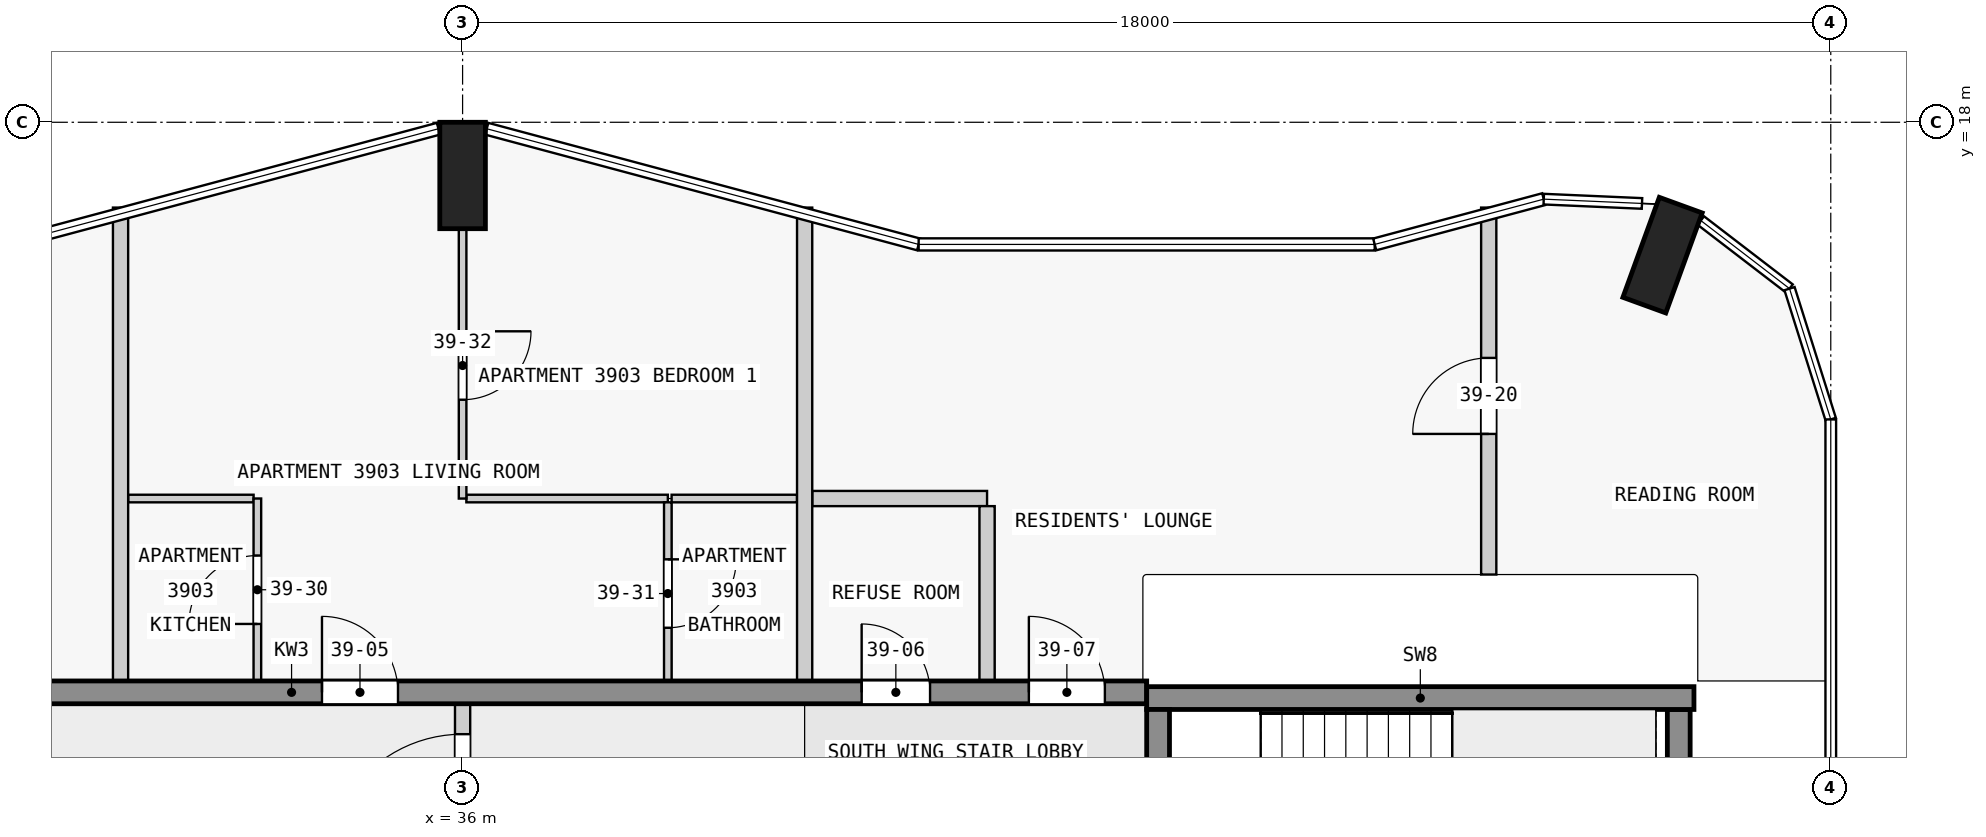
"""IFC4 building model, lengths in metres.
Left out: names, types, materials, properties, quantities, classifications, styles, units other than length and angle.
Written with IfcOpenShell. Run it as: python <this file> out.ifc"""

import sys

from ifc_helpers import new_model, si_unit, direction, frame, frame_2d, origin, origin_2d, place, context, subcontext, project, spatial, rectangle, extrude, element, fill, save


model = new_model("IFC4")
c1 = context("Model", 3, precision=1e-05, world=origin(), true_north=direction((0.0, 1.0)))
c2 = subcontext(c1, "Body", "Model", "MODEL_VIEW")
j1 = project(units=[si_unit("LENGTHUNIT", "METRE"), si_unit("PLANEANGLEUNIT", "RADIAN")], contexts=[c1])
p1 = place(None, origin())
s1 = spatial("IfcSite", under=j1, at=p1, CompositionType="ELEMENT")
p2 = place(p1, origin())
s2 = spatial("IfcBuilding", under=s1, at=p2, CompositionType="ELEMENT")
p3 = place(p2, frame((0.0, 0.0, 153.4)))
s3 = spatial("IfcBuildingStorey", under=s2, at=p3, CompositionType="ELEMENT", Elevation=153.4)
for number, where, z_axis, x_axis in (
    (1, (51.787, 16.252, 0.0), (0.0, 0.0, 1.0), (-0.94, 0.342, 0.0)),
    (2, (36.0, 17.3, 0.0), (0.0, 0.0, 1.0), (1.0, 0.0, 0.0)),
):
    element("IfcColumn", number, at=place(p3, frame(where, z_axis=z_axis, x_axis=x_axis)), inside=s3, PredefinedType="COLUMN", context=c2, shape_type="SweptSolid", body=[
        extrude(rectangle(XDim=0.6, YDim=1.4, at=origin_2d()), origin(), (0.0, 0.0, 1.0), 3.5),
    ])
p4 = place(p3, frame((45.15, 7.725, 0.0), z_axis=(0.0, 0.0, 1.0), x_axis=(0.0, 1.0, 0.0)))
e3 = element("IfcWall", 3, at=p4, inside=s3, PredefinedType="SHEAR", context=c2, shape_type="SweptSolid", body=[
    extrude(rectangle(XDim=2.55, YDim=0.3, at=frame_2d((1.275, 0.0))), origin(), (0.0, 0.0, 1.0), 3.5),
])
p5 = place(p4, frame((0.725, 0.0, 0.0)))
e4 = element("IfcOpeningElement", 4, at=p5, cuts=e3, PredefinedType="OPENING", context=c2, shape_type="SweptSolid", body=[
    extrude(rectangle(XDim=1.1, YDim=2.1, at=frame_2d((0.55, 1.05))), frame((0.0, 0.16, 0.0), z_axis=(0.0, -1.0, 0.0), x_axis=(1.0, 0.0, 0.0)), (0.0, 0.0, 1.0), 0.32),
])
p6 = place(p3, frame((52.0, 7.725, 0.0), z_axis=(0.0, 0.0, 1.0), x_axis=(0.0, 1.0, 0.0)))
e5 = element("IfcWall", 5, at=p6, inside=s3, PredefinedType="SHEAR", context=c2, shape_type="SweptSolid", body=[
    extrude(rectangle(XDim=2.55, YDim=0.3, at=frame_2d((1.275, 0.0))), origin(), (0.0, 0.0, 1.0), 3.5),
])
p7 = place(p3, frame((45.0, 10.425, 0.0), z_axis=(0.0, 0.0, 1.0), x_axis=(1.0, 0.0, 0.0)))
e6 = element("IfcWall", 6, at=p7, inside=s3, PredefinedType="SHEAR", context=c2, shape_type="SweptSolid", body=[
    extrude(rectangle(XDim=7.2, YDim=0.3, at=frame_2d((3.6, 0.0))), origin(), (0.0, 0.0, 1.0), 3.5),
])
p8 = place(p3, frame((22.5, 10.5, 0.0), z_axis=(0.0, 0.0, 1.0), x_axis=(1.0, 0.0, 0.0)))
e7 = element("IfcWall", 7, at=p8, inside=s3, PredefinedType="SHEAR", context=c2, shape_type="SweptSolid", body=[
    extrude(rectangle(XDim=22.5, YDim=0.3, at=frame_2d((11.25, 0.0))), origin(), (0.0, 0.0, 1.0), 3.25),
])
p9 = place(p8, frame((4.05, 0.0, 0.0)))
e8 = element("IfcOpeningElement", 8, at=p9, cuts=e7, PredefinedType="OPENING", context=c2, shape_type="SweptSolid", body=[
    extrude(rectangle(XDim=1.0, YDim=2.1, at=frame_2d((0.5, 1.05))), frame((0.0, 0.16, 0.0), z_axis=(0.0, -1.0, 0.0), x_axis=(1.0, 0.0, 0.0)), (0.0, 0.0, 1.0), 0.32),
])
p10 = place(p8, frame((11.65, 0.0, 0.0)))
e9 = element("IfcOpeningElement", 9, at=p10, cuts=e7, PredefinedType="OPENING", context=c2, shape_type="SweptSolid", body=[
    extrude(rectangle(XDim=1.0, YDim=2.1, at=frame_2d((0.5, 1.05))), frame((0.0, 0.16, 0.0), z_axis=(0.0, -1.0, 0.0), x_axis=(1.0, 0.0, 0.0)), (0.0, 0.0, 1.0), 0.32),
])
p11 = place(p8, frame((18.75, 0.0, 0.0)))
e10 = element("IfcOpeningElement", 10, at=p11, cuts=e7, PredefinedType="OPENING", context=c2, shape_type="SweptSolid", body=[
    extrude(rectangle(XDim=0.9, YDim=2.1, at=frame_2d((0.45, 1.05))), frame((0.0, 0.16, 0.0), z_axis=(0.0, -1.0, 0.0), x_axis=(1.0, 0.0, 0.0)), (0.0, 0.0, 1.0), 0.32),
])
p12 = place(p8, frame((20.95, 0.0, 0.0)))
e11 = element("IfcOpeningElement", 11, at=p12, cuts=e7, PredefinedType="OPENING", context=c2, shape_type="SweptSolid", body=[
    extrude(rectangle(XDim=1.0, YDim=2.1, at=frame_2d((0.5, 1.05))), frame((0.0, 0.16, 0.0), z_axis=(0.0, -1.0, 0.0), x_axis=(1.0, 0.0, 0.0)), (0.0, 0.0, 1.0), 0.32),
])
for number, where, z_axis, x_axis in (
    (12, (33.25, 13.05, 0.0), (0.0, 0.0, 1.0), (-1.0, 0.0, 0.0)),
    (13, (40.4, 13.05, 0.0), (0.0, 0.0, 1.0), (-1.0, 0.0, 0.0)),
):
    element("IfcWall", number, at=place(p3, frame(where, z_axis=z_axis, x_axis=x_axis)), inside=s3, PredefinedType="PARTITIONING", context=c2, shape_type="SweptSolid", body=[
        extrude(rectangle(XDim=1.65, YDim=0.1, at=frame_2d((0.825, 0.0))), origin(), (0.0, 0.0, 1.0), 3.25),
    ])
p13 = place(p3, frame((36.05, 13.05, 0.0), z_axis=(0.0, 0.0, 1.0), x_axis=(1.0, 0.0, 0.0)))
e14 = element("IfcWall", 14, at=p13, inside=s3, PredefinedType="PARTITIONING", context=c2, shape_type="SweptSolid", body=[
    extrude(rectangle(XDim=2.65, YDim=0.1, at=frame_2d((1.325, 0.0))), origin(), (0.0, 0.0, 1.0), 3.25),
])
p14 = place(p3, frame((42.9, 13.05, 0.0), z_axis=(0.0, 0.0, 1.0), x_axis=(-1.0, 0.0, 0.0)))
e15 = element("IfcWall", 15, at=p14, inside=s3, PredefinedType="PARTITIONING", context=c2, shape_type="SweptSolid", body=[
    extrude(rectangle(XDim=2.3, YDim=0.2, at=frame_2d((1.15, 0.0))), origin(), (0.0, 0.0, 1.0), 3.25),
])
p15 = place(p3, frame((31.5, 10.65, 0.0), z_axis=(0.0, 0.0, 1.0), x_axis=(0.0, 1.0, 0.0)))
e16 = element("IfcWall", 16, at=p15, inside=s3, PredefinedType="PARTITIONING", context=c2, shape_type="SweptSolid", body=[
    extrude(rectangle(XDim=6.228, YDim=0.2, at=frame_2d((3.114, 0.0))), origin(), (0.0, 0.0, 1.0), 3.25),
])
p16 = place(p3, frame((33.3, 10.65, 0.0), z_axis=(0.0, 0.0, 1.0), x_axis=(0.0, 1.0, 0.0)))
e17 = element("IfcWall", 17, at=p16, inside=s3, PredefinedType="PARTITIONING", context=c2, shape_type="SweptSolid", body=[
    extrude(rectangle(XDim=2.4, YDim=0.1, at=frame_2d((1.2, 0.0))), origin(), (0.0, 0.0, 1.0), 3.25),
])
p17 = place(p16, frame((0.75, 0.0, 0.0)))
e18 = element("IfcOpeningElement", 18, at=p17, cuts=e17, PredefinedType="OPENING", context=c2, shape_type="SweptSolid", body=[
    extrude(rectangle(XDim=0.9, YDim=2.1, at=frame_2d((0.45, 1.05))), frame((0.0, 0.06, 0.0), z_axis=(0.0, -1.0, 0.0), x_axis=(1.0, 0.0, 0.0)), (0.0, 0.0, 1.0), 0.12),
])
p18 = place(p3, frame((36.0, 16.6, 0.0), z_axis=(0.0, 0.0, 1.0), x_axis=(0.0, -1.0, 0.0)))
e19 = element("IfcWall", 19, at=p18, inside=s3, PredefinedType="PARTITIONING", context=c2, shape_type="SweptSolid", body=[
    extrude(rectangle(XDim=3.55, YDim=0.1, at=frame_2d((1.775, 0.0))), origin(), (0.0, 0.0, 1.0), 3.25),
])
p19 = place(p18, frame((1.35, 0.0, 0.0)))
e20 = element("IfcOpeningElement", 20, at=p19, cuts=e19, PredefinedType="OPENING", context=c2, shape_type="SweptSolid", body=[
    extrude(rectangle(XDim=0.9, YDim=2.1, at=frame_2d((0.45, 1.05))), frame((0.0, 0.06, 0.0), z_axis=(0.0, -1.0, 0.0), x_axis=(1.0, 0.0, 0.0)), (0.0, 0.0, 1.0), 0.12),
])
p20 = place(p3, frame((38.7, 13.0, 0.0), z_axis=(0.0, 0.0, 1.0), x_axis=(0.0, -1.0, 0.0)))
e21 = element("IfcWall", 21, at=p20, inside=s3, PredefinedType="PARTITIONING", context=c2, shape_type="SweptSolid", body=[
    extrude(rectangle(XDim=2.35, YDim=0.1, at=frame_2d((1.175, 0.0))), origin(), (0.0, 0.0, 1.0), 3.25),
])
p21 = place(p20, frame((0.75, 0.0, 0.0)))
e22 = element("IfcOpeningElement", 22, at=p21, cuts=e21, PredefinedType="OPENING", context=c2, shape_type="SweptSolid", body=[
    extrude(rectangle(XDim=0.9, YDim=2.1, at=frame_2d((0.45, 1.05))), frame((0.0, 0.06, 0.0), z_axis=(0.0, -1.0, 0.0), x_axis=(1.0, 0.0, 0.0)), (0.0, 0.0, 1.0), 0.12),
])
p22 = place(p3, frame((40.5, 10.65, 0.0), z_axis=(0.0, 0.0, 1.0), x_axis=(0.0, 1.0, 0.0)))
e23 = element("IfcWall", 23, at=p22, inside=s3, PredefinedType="PARTITIONING", context=c2, shape_type="SweptSolid", body=[
    extrude(rectangle(XDim=6.228, YDim=0.2, at=frame_2d((3.114, 0.0))), origin(), (0.0, 0.0, 1.0), 3.25),
])
p23 = place(p3, frame((42.9, 10.65, 0.0), z_axis=(0.0, 0.0, 1.0), x_axis=(0.0, 1.0, 0.0)))
e24 = element("IfcWall", 24, at=p23, inside=s3, PredefinedType="PARTITIONING", context=c2, shape_type="SweptSolid", body=[
    extrude(rectangle(XDim=2.3, YDim=0.2, at=frame_2d((1.15, 0.0))), origin(), (0.0, 0.0, 1.0), 3.25),
])
p24 = place(p3, frame((49.5, 12.05, 0.0), z_axis=(0.0, 0.0, 1.0), x_axis=(0.0, 1.0, 0.0)))
e25 = element("IfcWall", 25, at=p24, inside=s3, PredefinedType="PARTITIONING", context=c2, shape_type="SweptSolid", body=[
    extrude(rectangle(XDim=4.828, YDim=0.2, at=frame_2d((2.414, 0.0))), origin(), (0.0, 0.0, 1.0), 3.25),
])
p25 = place(p24, frame((1.85, 0.0, 0.0)))
e26 = element("IfcOpeningElement", 26, at=p25, cuts=e25, PredefinedType="OPENING", context=c2, shape_type="SweptSolid", body=[
    extrude(rectangle(XDim=1.0, YDim=2.1, at=frame_2d((0.5, 1.05))), frame((0.0, 0.11, 0.0), z_axis=(0.0, -1.0, 0.0), x_axis=(1.0, 0.0, 0.0)), (0.0, 0.0, 1.0), 0.22),
])
p26 = place(p3, frame((36.0, 7.45, 0.0), z_axis=(0.0, 0.0, 1.0), x_axis=(0.0, 1.0, 0.0)))
e27 = element("IfcWall", 27, at=p26, inside=s3, PredefinedType="PARTITIONING", context=c2, shape_type="SweptSolid", body=[
    extrude(rectangle(XDim=3.2, YDim=0.2, at=frame_2d((1.6, 0.0))), origin(), (0.0, 0.0, 1.0), 3.25),
])
p27 = place(p26, frame((0.7, 0.0, 0.0)))
e28 = element("IfcOpeningElement", 28, at=p27, cuts=e27, PredefinedType="OPENING", context=c2, shape_type="SweptSolid", body=[
    extrude(rectangle(XDim=1.8, YDim=2.1, at=frame_2d((0.9, 1.05))), frame((0.0, 0.11, 0.0), z_axis=(0.0, -1.0, 0.0), x_axis=(1.0, 0.0, 0.0)), (0.0, 0.0, 1.0), 0.22),
])
p28 = place(p10, origin())
e29 = element("IfcDoor", 29, at=p28, inside=s3, OperationType="SINGLE_SWING_RIGHT", PredefinedType="DOOR", context=c2, shape_type="SweptSolid", body=[
    extrude(rectangle(XDim=1.0, YDim=2.1, at=frame_2d((0.5, 1.05))), frame((0.0, 0.025, 0.0), z_axis=(0.0, -1.0, 0.0), x_axis=(1.0, 0.0, 0.0)), (0.0, 0.0, 1.0), 0.05),
])
fill(e9, e29)
p29 = place(p11, origin())
e30 = element("IfcDoor", 30, at=p29, inside=s3, OperationType="SINGLE_SWING_RIGHT", PredefinedType="DOOR", context=c2, shape_type="SweptSolid", body=[
    extrude(rectangle(XDim=0.9, YDim=2.1, at=frame_2d((0.45, 1.05))), frame((0.0, 0.025, 0.0), z_axis=(0.0, -1.0, 0.0), x_axis=(1.0, 0.0, 0.0)), (0.0, 0.0, 1.0), 0.05),
])
fill(e10, e30)
p30 = place(p12, origin())
e31 = element("IfcDoor", 31, at=p30, inside=s3, OperationType="SINGLE_SWING_RIGHT", PredefinedType="DOOR", context=c2, shape_type="SweptSolid", body=[
    extrude(rectangle(XDim=1.0, YDim=2.1, at=frame_2d((0.5, 1.05))), frame((0.0, 0.025, 0.0), z_axis=(0.0, -1.0, 0.0), x_axis=(1.0, 0.0, 0.0)), (0.0, 0.0, 1.0), 0.05),
])
fill(e11, e31)
p31 = place(p27, origin())
e32 = element("IfcDoor", 32, at=p31, inside=s3, OperationType="SINGLE_SWING_LEFT", PredefinedType="DOOR", context=c2, shape_type="SweptSolid", body=[
    extrude(rectangle(XDim=1.8, YDim=2.1, at=frame_2d((0.9, 1.05))), frame((0.0, 0.025, 0.0), z_axis=(0.0, -1.0, 0.0), x_axis=(1.0, 0.0, 0.0)), (0.0, 0.0, 1.0), 0.05),
])
fill(e28, e32)
p32 = place(p25, origin())
e33 = element("IfcDoor", 33, at=p32, inside=s3, OperationType="SINGLE_SWING_LEFT", PredefinedType="DOOR", context=c2, shape_type="SweptSolid", body=[
    extrude(rectangle(XDim=1.0, YDim=2.1, at=frame_2d((0.5, 1.05))), frame((0.0, 0.025, 0.0), z_axis=(0.0, -1.0, 0.0), x_axis=(1.0, 0.0, 0.0)), (0.0, 0.0, 1.0), 0.05),
])
fill(e26, e33)
p33 = place(p17, origin())
e34 = element("IfcDoor", 34, at=p33, inside=s3, OperationType="SINGLE_SWING_LEFT", PredefinedType="DOOR", context=c2, shape_type="SweptSolid", body=[
    extrude(rectangle(XDim=0.9, YDim=2.1, at=frame_2d((0.45, 1.05))), frame((0.0, 0.025, 0.0), z_axis=(0.0, -1.0, 0.0), x_axis=(1.0, 0.0, 0.0)), (0.0, 0.0, 1.0), 0.05),
])
fill(e18, e34)
p34 = place(p21, origin())
e35 = element("IfcDoor", 35, at=p34, inside=s3, OperationType="SINGLE_SWING_RIGHT", PredefinedType="DOOR", context=c2, shape_type="SweptSolid", body=[
    extrude(rectangle(XDim=0.9, YDim=2.1, at=frame_2d((0.45, 1.05))), frame((0.0, 0.025, 0.0), z_axis=(0.0, -1.0, 0.0), x_axis=(1.0, 0.0, 0.0)), (0.0, 0.0, 1.0), 0.05),
])
fill(e22, e35)
p35 = place(p19, origin())
e36 = element("IfcDoor", 36, at=p35, inside=s3, OperationType="SINGLE_SWING_RIGHT", PredefinedType="DOOR", context=c2, shape_type="SweptSolid", body=[
    extrude(rectangle(XDim=0.9, YDim=2.1, at=frame_2d((0.45, 1.05))), frame((0.0, 0.025, 0.0), z_axis=(0.0, -1.0, 0.0), x_axis=(1.0, 0.0, 0.0)), (0.0, 0.0, 1.0), 0.05),
])
fill(e20, e36)
save(model, sys.argv[1])
